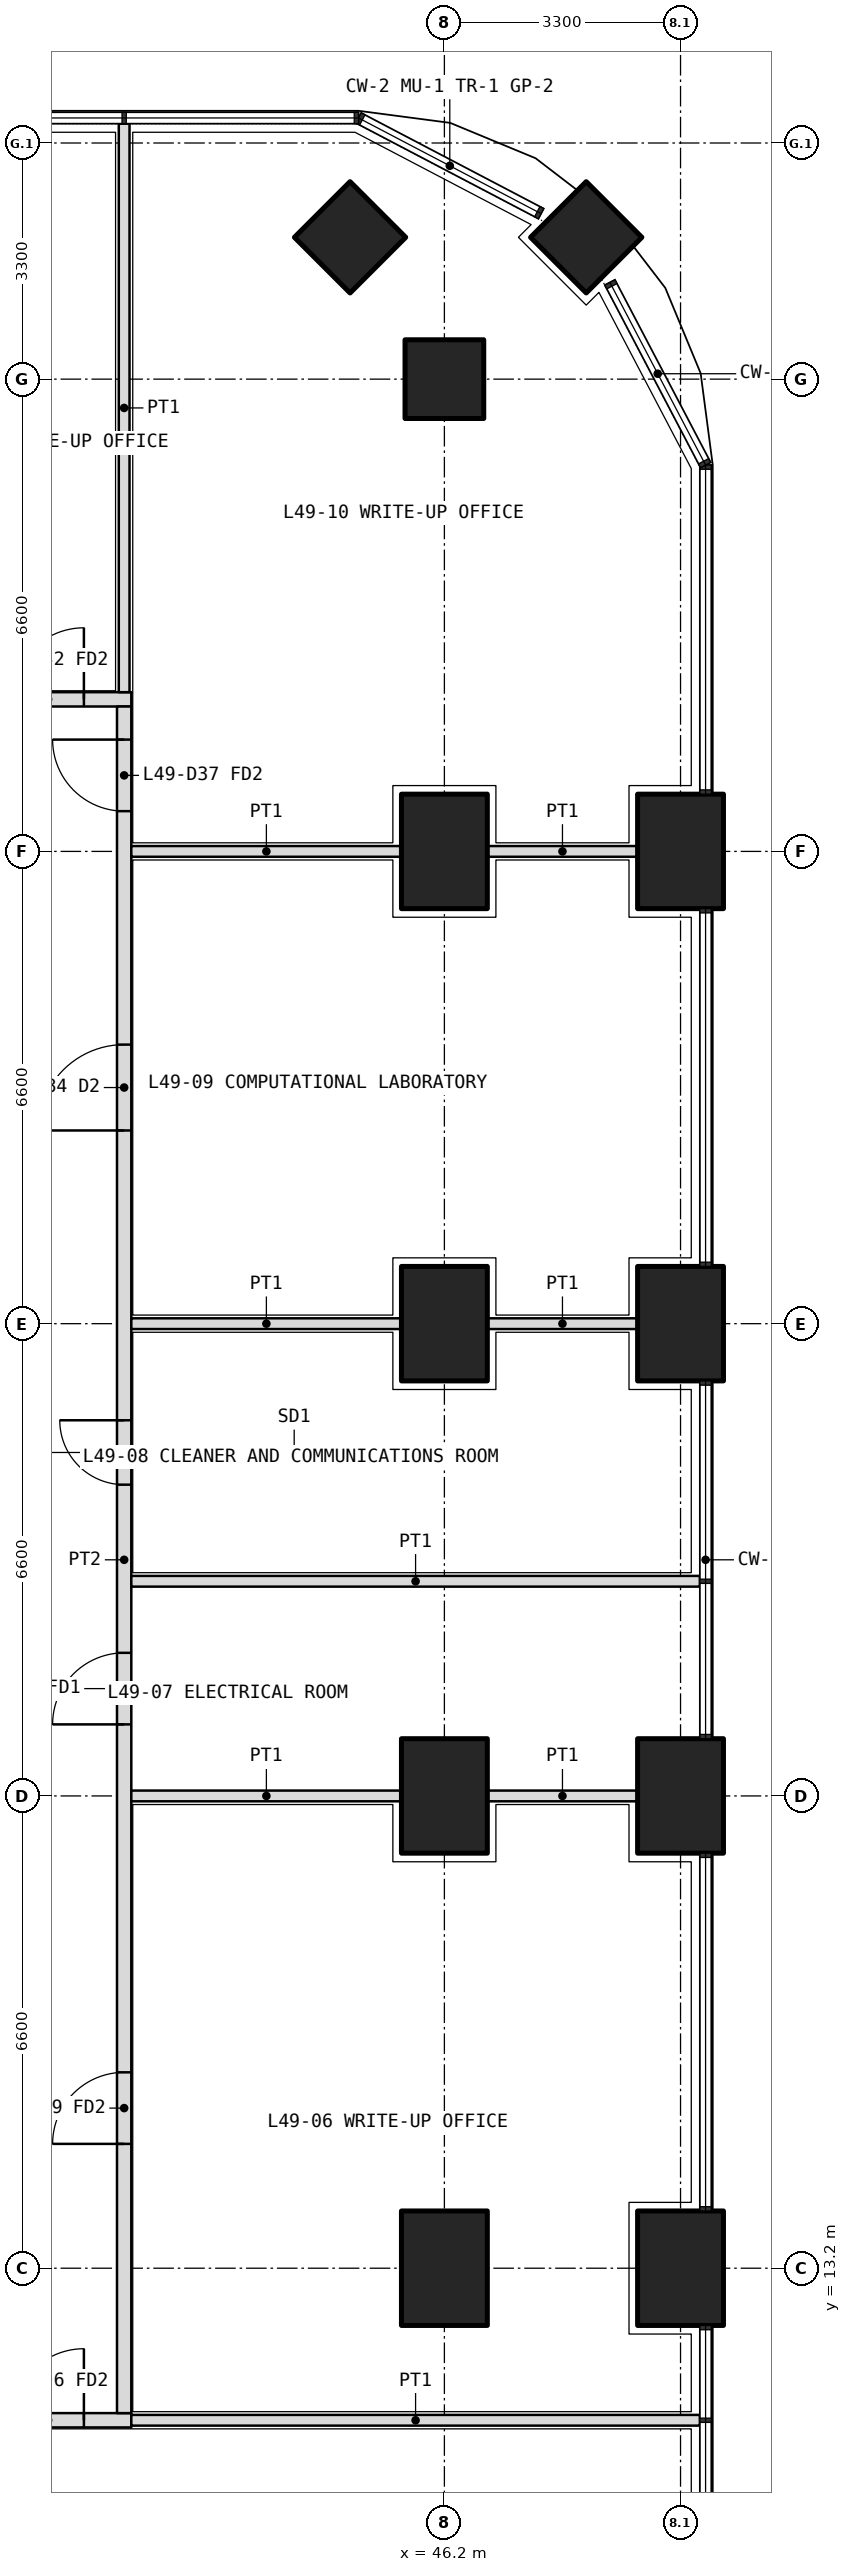
"""IFC4 building model, lengths in metres.
Left out: names, types, materials, properties, quantities, classifications, styles, units other than length and angle.
Written with IfcOpenShell. Run it as: python <this file> out.ifc"""

import sys

from ifc_helpers import new_model, si_unit, direction, frame, frame_2d, origin, origin_2d, place, context, subcontext, project, spatial, rectangle, extrude, element, fill, save


model = new_model("IFC4")
c1 = context("Model", 3, precision=1e-05, world=origin(), true_north=direction((0.0, 1.0)))
c2 = subcontext(c1, "Body", "Model", "MODEL_VIEW")
j1 = project(units=[si_unit("LENGTHUNIT", "METRE"), si_unit("PLANEANGLEUNIT", "RADIAN")], contexts=[c1])
p1 = place(None, origin())
s1 = spatial("IfcSite", under=j1, at=p1, CompositionType="ELEMENT")
p2 = place(p1, origin())
s2 = spatial("IfcBuilding", under=s1, at=p2, CompositionType="ELEMENT")
p3 = place(p2, frame((0.0, 0.0, 214.5)))
s3 = spatial("IfcBuildingStorey", under=s2, at=p3, CompositionType="ELEMENT", Elevation=214.5)
p4 = place(p3, frame((48.182, 41.582, 0.0), z_axis=(0.0, 0.0, 1.0), x_axis=(0.707106781187, 0.707106781187, 0.0)))
e1 = element("IfcColumn", 1, at=p4, inside=s3, PredefinedType="COLUMN", context=c2, shape_type="SweptSolid", body=[
    extrude(rectangle(XDim=1.1, YDim=1.1, at=origin_2d()), origin(), (0.0, 0.0, 1.0), 4.2),
])
for number, where, z_axis, x_axis in (
    (2, (49.5, 13.2, 0.0), (0.0, 0.0, 1.0), (0.0, 1.0, 0.0)),
    (3, (49.5, 19.8, 0.0), (0.0, 0.0, 1.0), (0.0, 1.0, 0.0)),
    (4, (49.5, 26.4, 0.0), (0.0, 0.0, 1.0), (0.0, 1.0, 0.0)),
    (5, (49.5, 33.0, 0.0), (0.0, 0.0, 1.0), (0.0, 1.0, 0.0)),
):
    element("IfcColumn", number, at=place(p3, frame(where, z_axis=z_axis, x_axis=x_axis)), inside=s3, PredefinedType="COLUMN", context=c2, shape_type="SweptSolid", body=[
        extrude(rectangle(XDim=1.6, YDim=1.2, at=origin_2d()), origin(), (0.0, 0.0, 1.0), 4.2),
    ])
for number, where, z_axis, x_axis in (
    (6, (46.2, 39.6, 0.0), (0.0, 0.0, 1.0), (1.0, 0.0, 0.0)),
    (7, (44.882, 41.582, 0.0), (0.0, 0.0, 1.0), (0.707, 0.707, 0.0)),
):
    element("IfcColumn", number, at=place(p3, frame(where, z_axis=z_axis, x_axis=x_axis)), inside=s3, PredefinedType="COLUMN", context=c2, shape_type="SweptSolid", body=[
        extrude(rectangle(XDim=1.1, YDim=1.1, at=origin_2d()), origin(), (0.0, 0.0, 1.0), 4.2),
    ])
for number, where, z_axis, x_axis in (
    (8, (46.2, 13.2, 0.0), (0.0, 0.0, 1.0), (0.0, 1.0, 0.0)),
    (9, (46.2, 19.8, 0.0), (0.0, 0.0, 1.0), (0.0, 1.0, 0.0)),
    (10, (46.2, 26.4, 0.0), (0.0, 0.0, 1.0), (0.0, 1.0, 0.0)),
    (11, (46.2, 33.0, 0.0), (0.0, 0.0, 1.0), (0.0, 1.0, 0.0)),
):
    element("IfcColumn", number, at=place(p3, frame(where, z_axis=z_axis, x_axis=x_axis)), inside=s3, PredefinedType="COLUMN", context=c2, shape_type="SweptSolid", body=[
        extrude(rectangle(XDim=1.6, YDim=1.2, at=origin_2d()), origin(), (0.0, 0.0, 1.0), 4.2),
    ])
p5 = place(p3, frame((10.975, 11.075, 0.0), z_axis=(0.0, 0.0, 1.0), x_axis=(1.0, 0.0, 0.0)))
e12 = element("IfcWall", 12, at=p5, inside=s3, PredefinedType="PARTITIONING", context=c2, shape_type="SweptSolid", body=[
    extrude(rectangle(XDim=30.85, YDim=0.2, at=frame_2d((15.425, 0.0))), origin(), (0.0, 0.0, 1.0), 2.85),
])
p6 = place(p5, frame((2.312, 0.0, 0.0)))
e13 = element("IfcOpeningElement", 13, at=p6, cuts=e12, PredefinedType="OPENING", context=c2, shape_type="SweptSolid", body=[
    extrude(rectangle(XDim=1.0, YDim=2.1, at=frame_2d((0.5, 1.05))), frame((0.0, 0.11, 0.0), z_axis=(0.0, -1.0, 0.0), x_axis=(1.0, 0.0, 0.0)), (0.0, 0.0, 1.0), 0.22),
])
p7 = place(p5, frame((9.975, 0.0, 0.0)))
e14 = element("IfcOpeningElement", 14, at=p7, cuts=e12, PredefinedType="OPENING", context=c2, shape_type="SweptSolid", body=[
    extrude(rectangle(XDim=1.0, YDim=2.1, at=frame_2d((0.5, 1.05))), frame((0.0, 0.11, 0.0), z_axis=(0.0, -1.0, 0.0), x_axis=(1.0, 0.0, 0.0)), (0.0, 0.0, 1.0), 0.22),
])
p8 = place(p5, frame((16.575, 0.0, 0.0)))
e15 = element("IfcOpeningElement", 15, at=p8, cuts=e12, PredefinedType="OPENING", context=c2, shape_type="SweptSolid", body=[
    extrude(rectangle(XDim=1.0, YDim=2.1, at=frame_2d((0.5, 1.05))), frame((0.0, 0.11, 0.0), z_axis=(0.0, -1.0, 0.0), x_axis=(1.0, 0.0, 0.0)), (0.0, 0.0, 1.0), 0.22),
])
p9 = place(p5, frame((23.175, 0.0, 0.0)))
e16 = element("IfcOpeningElement", 16, at=p9, cuts=e12, PredefinedType="OPENING", context=c2, shape_type="SweptSolid", body=[
    extrude(rectangle(XDim=1.0, YDim=2.1, at=frame_2d((0.5, 1.05))), frame((0.0, 0.11, 0.0), z_axis=(0.0, -1.0, 0.0), x_axis=(1.0, 0.0, 0.0)), (0.0, 0.0, 1.0), 0.22),
])
p10 = place(p5, frame((29.188, 0.0, 0.0)))
e17 = element("IfcOpeningElement", 17, at=p10, cuts=e12, PredefinedType="OPENING", context=c2, shape_type="SweptSolid", body=[
    extrude(rectangle(XDim=1.0, YDim=2.1, at=frame_2d((0.5, 1.05))), frame((0.0, 0.11, 0.0), z_axis=(0.0, -1.0, 0.0), x_axis=(1.0, 0.0, 0.0)), (0.0, 0.0, 1.0), 0.22),
])
p11 = place(p3, frame((23.1, 35.125, 0.0), z_axis=(0.0, 0.0, 1.0), x_axis=(1.0, 0.0, 0.0)))
e18 = element("IfcWall", 18, at=p11, inside=s3, PredefinedType="PARTITIONING", context=c2, shape_type="SweptSolid", body=[
    extrude(rectangle(XDim=18.725, YDim=0.2, at=frame_2d((9.362, 0.0))), origin(), (0.0, 0.0, 1.0), 2.85),
])
p12 = place(p11, frame((1.25, 0.0, 0.0)))
e19 = element("IfcOpeningElement", 19, at=p12, cuts=e18, PredefinedType="OPENING", context=c2, shape_type="SweptSolid", body=[
    extrude(rectangle(XDim=1.0, YDim=2.1, at=frame_2d((0.5, 1.05))), frame((0.0, 0.11, 0.0), z_axis=(0.0, -1.0, 0.0), x_axis=(1.0, 0.0, 0.0)), (0.0, 0.0, 1.0), 0.22),
])
p13 = place(p11, frame((4.55, 0.0, 0.0)))
e20 = element("IfcOpeningElement", 20, at=p13, cuts=e18, PredefinedType="OPENING", context=c2, shape_type="SweptSolid", body=[
    extrude(rectangle(XDim=1.0, YDim=2.1, at=frame_2d((0.5, 1.05))), frame((0.0, 0.11, 0.0), z_axis=(0.0, -1.0, 0.0), x_axis=(1.0, 0.0, 0.0)), (0.0, 0.0, 1.0), 0.22),
])
p14 = place(p11, frame((10.95, 0.0, 0.0)))
e21 = element("IfcOpeningElement", 21, at=p14, cuts=e18, PredefinedType="OPENING", context=c2, shape_type="SweptSolid", body=[
    extrude(rectangle(XDim=1.2, YDim=2.1, at=frame_2d((0.6, 1.05))), frame((0.0, 0.11, 0.0), z_axis=(0.0, -1.0, 0.0), x_axis=(1.0, 0.0, 0.0)), (0.0, 0.0, 1.0), 0.22),
])
p15 = place(p11, frame((17.062, 0.0, 0.0)))
e22 = element("IfcOpeningElement", 22, at=p15, cuts=e18, PredefinedType="OPENING", context=c2, shape_type="SweptSolid", body=[
    extrude(rectangle(XDim=1.0, YDim=2.1, at=frame_2d((0.5, 1.05))), frame((0.0, 0.11, 0.0), z_axis=(0.0, -1.0, 0.0), x_axis=(1.0, 0.0, 0.0)), (0.0, 0.0, 1.0), 0.22),
])
p16 = place(p3, frame((41.725, 11.175, 0.0), z_axis=(0.0, 0.0, 1.0), x_axis=(0.0, 1.0, 0.0)))
e23 = element("IfcWall", 23, at=p16, inside=s3, PredefinedType="PARTITIONING", context=c2, shape_type="SweptSolid", body=[
    extrude(rectangle(XDim=23.85, YDim=0.2, at=frame_2d((11.925, 0.0))), origin(), (0.0, 0.0, 1.0), 2.85),
])
p17 = place(p16, frame((3.762, 0.0, 0.0)))
e24 = element("IfcOpeningElement", 24, at=p17, cuts=e23, PredefinedType="OPENING", context=c2, shape_type="SweptSolid", body=[
    extrude(rectangle(XDim=1.0, YDim=2.1, at=frame_2d((0.5, 1.05))), frame((0.0, 0.11, 0.0), z_axis=(0.0, -1.0, 0.0), x_axis=(1.0, 0.0, 0.0)), (0.0, 0.0, 1.0), 0.22),
])
p18 = place(p16, frame((9.625, 0.0, 0.0)))
e25 = element("IfcOpeningElement", 25, at=p18, cuts=e23, PredefinedType="OPENING", context=c2, shape_type="SweptSolid", body=[
    extrude(rectangle(XDim=1.0, YDim=2.1, at=frame_2d((0.5, 1.05))), frame((0.0, 0.11, 0.0), z_axis=(0.0, -1.0, 0.0), x_axis=(1.0, 0.0, 0.0)), (0.0, 0.0, 1.0), 0.22),
])
p19 = place(p16, frame((12.975, 0.0, 0.0)))
e26 = element("IfcOpeningElement", 26, at=p19, cuts=e23, PredefinedType="OPENING", context=c2, shape_type="SweptSolid", body=[
    extrude(rectangle(XDim=0.9, YDim=2.1, at=frame_2d((0.45, 1.05))), frame((0.0, 0.11, 0.0), z_axis=(0.0, -1.0, 0.0), x_axis=(1.0, 0.0, 0.0)), (0.0, 0.0, 1.0), 0.22),
])
p20 = place(p16, frame((17.925, 0.0, 0.0)))
e27 = element("IfcOpeningElement", 27, at=p20, cuts=e23, PredefinedType="OPENING", context=c2, shape_type="SweptSolid", body=[
    extrude(rectangle(XDim=1.2, YDim=2.1, at=frame_2d((0.6, 1.05))), frame((0.0, 0.11, 0.0), z_axis=(0.0, -1.0, 0.0), x_axis=(1.0, 0.0, 0.0)), (0.0, 0.0, 1.0), 0.22),
])
p21 = place(p16, frame((22.387, 0.0, 0.0)))
e28 = element("IfcOpeningElement", 28, at=p21, cuts=e23, PredefinedType="OPENING", context=c2, shape_type="SweptSolid", body=[
    extrude(rectangle(XDim=1.0, YDim=2.1, at=frame_2d((0.5, 1.05))), frame((0.0, 0.11, 0.0), z_axis=(0.0, -1.0, 0.0), x_axis=(1.0, 0.0, 0.0)), (0.0, 0.0, 1.0), 0.22),
])
p22 = place(p3, frame((49.77, 11.075, 0.0), z_axis=(0.0, 0.0, 1.0), x_axis=(-1.0, 0.0, 0.0)))
e29 = element("IfcWall", 29, at=p22, inside=s3, PredefinedType="PARTITIONING", context=c2, shape_type="SweptSolid", body=[
    extrude(rectangle(XDim=7.945, YDim=0.15, at=frame_2d((3.973, 0.0))), origin(), (0.0, 0.0, 1.0), 2.6),
])
p23 = place(p3, frame((41.725, 43.17, 0.0), z_axis=(0.0, 0.0, 1.0), x_axis=(0.0, -1.0, 0.0)))
e30 = element("IfcWall", 30, at=p23, inside=s3, PredefinedType="PARTITIONING", context=c2, shape_type="SweptSolid", body=[
    extrude(rectangle(XDim=7.945, YDim=0.15, at=frame_2d((3.972, 0.0))), origin(), (0.0, 0.0, 1.0), 2.6),
])
p24 = place(p3, frame((49.77, 22.8, 0.0), z_axis=(0.0, 0.0, 1.0), x_axis=(-1.0, 0.0, 0.0)))
e31 = element("IfcWall", 31, at=p24, inside=s3, PredefinedType="PARTITIONING", context=c2, shape_type="SweptSolid", body=[
    extrude(rectangle(XDim=7.945, YDim=0.15, at=frame_2d((3.973, 0.0))), origin(), (0.0, 0.0, 1.0), 2.6),
])
p25 = place(p3, frame((48.9, 26.4, 0.0), z_axis=(0.0, 0.0, 1.0), x_axis=(-1.0, 0.0, 0.0)))
e32 = element("IfcWall", 32, at=p25, inside=s3, PredefinedType="PARTITIONING", context=c2, shape_type="SweptSolid", body=[
    extrude(rectangle(XDim=2.1, YDim=0.15, at=frame_2d((1.05, 0.0))), origin(), (0.0, 0.0, 1.0), 2.85),
])
p26 = place(p3, frame((45.6, 26.4, 0.0), z_axis=(0.0, 0.0, 1.0), x_axis=(-1.0, 0.0, 0.0)))
e33 = element("IfcWall", 33, at=p26, inside=s3, PredefinedType="PARTITIONING", context=c2, shape_type="SweptSolid", body=[
    extrude(rectangle(XDim=3.775, YDim=0.15, at=frame_2d((1.888, 0.0))), origin(), (0.0, 0.0, 1.0), 2.85),
])
p27 = place(p3, frame((48.9, 19.8, 0.0), z_axis=(0.0, 0.0, 1.0), x_axis=(-1.0, 0.0, 0.0)))
e34 = element("IfcWall", 34, at=p27, inside=s3, PredefinedType="PARTITIONING", context=c2, shape_type="SweptSolid", body=[
    extrude(rectangle(XDim=2.1, YDim=0.15, at=frame_2d((1.05, 0.0))), origin(), (0.0, 0.0, 1.0), 2.85),
])
p28 = place(p3, frame((45.6, 19.8, 0.0), z_axis=(0.0, 0.0, 1.0), x_axis=(-1.0, 0.0, 0.0)))
e35 = element("IfcWall", 35, at=p28, inside=s3, PredefinedType="PARTITIONING", context=c2, shape_type="SweptSolid", body=[
    extrude(rectangle(XDim=3.775, YDim=0.15, at=frame_2d((1.888, 0.0))), origin(), (0.0, 0.0, 1.0), 2.85),
])
p29 = place(p3, frame((48.9, 33.0, 0.0), z_axis=(0.0, 0.0, 1.0), x_axis=(-1.0, 0.0, 0.0)))
e36 = element("IfcWall", 36, at=p29, inside=s3, PredefinedType="PARTITIONING", context=c2, shape_type="SweptSolid", body=[
    extrude(rectangle(XDim=2.1, YDim=0.15, at=frame_2d((1.05, 0.0))), origin(), (0.0, 0.0, 1.0), 2.85),
])
p30 = place(p3, frame((45.6, 33.0, 0.0), z_axis=(0.0, 0.0, 1.0), x_axis=(-1.0, 0.0, 0.0)))
e37 = element("IfcWall", 37, at=p30, inside=s3, PredefinedType="PARTITIONING", context=c2, shape_type="SweptSolid", body=[
    extrude(rectangle(XDim=3.775, YDim=0.15, at=frame_2d((1.888, 0.0))), origin(), (0.0, 0.0, 1.0), 2.85),
])
p31 = place(p10, origin())
e38 = element("IfcDoor", 38, at=p31, inside=s3, OperationType="SINGLE_SWING_RIGHT", PredefinedType="DOOR", context=c2, shape_type="SweptSolid", body=[
    extrude(rectangle(XDim=1.0, YDim=2.1, at=frame_2d((0.5, 1.05))), frame((0.0, 0.025, 0.0), z_axis=(0.0, -1.0, 0.0), x_axis=(1.0, 0.0, 0.0)), (0.0, 0.0, 1.0), 0.05),
])
fill(e17, e38)
p32 = place(p17, origin())
e39 = element("IfcDoor", 39, at=p32, inside=s3, OperationType="SINGLE_SWING_LEFT", PredefinedType="DOOR", context=c2, shape_type="SweptSolid", body=[
    extrude(rectangle(XDim=1.0, YDim=2.1, at=frame_2d((0.5, 1.05))), frame((0.0, 0.025, 0.0), z_axis=(0.0, -1.0, 0.0), x_axis=(1.0, 0.0, 0.0)), (0.0, 0.0, 1.0), 0.05),
])
fill(e24, e39)
p33 = place(p18, origin())
e40 = element("IfcDoor", 40, at=p33, inside=s3, OperationType="SINGLE_SWING_LEFT", PredefinedType="DOOR", context=c2, shape_type="SweptSolid", body=[
    extrude(rectangle(XDim=1.0, YDim=2.1, at=frame_2d((0.5, 1.05))), frame((0.0, 0.025, 0.0), z_axis=(0.0, -1.0, 0.0), x_axis=(1.0, 0.0, 0.0)), (0.0, 0.0, 1.0), 0.05),
])
fill(e25, e40)
p34 = place(p19, origin())
e41 = element("IfcDoor", 41, at=p34, inside=s3, OperationType="SINGLE_SWING_RIGHT", PredefinedType="DOOR", context=c2, shape_type="SweptSolid", body=[
    extrude(rectangle(XDim=0.9, YDim=2.1, at=frame_2d((0.45, 1.05))), frame((0.0, 0.025, 0.0), z_axis=(0.0, -1.0, 0.0), x_axis=(1.0, 0.0, 0.0)), (0.0, 0.0, 1.0), 0.05),
])
fill(e26, e41)
p35 = place(p20, origin())
e42 = element("IfcDoor", 42, at=p35, inside=s3, OperationType="DOUBLE_DOOR_SINGLE_SWING", PredefinedType="DOOR", context=c2, shape_type="SweptSolid", body=[
    extrude(rectangle(XDim=1.2, YDim=2.1, at=frame_2d((0.6, 1.05))), frame((0.0, 0.025, 0.0), z_axis=(0.0, -1.0, 0.0), x_axis=(1.0, 0.0, 0.0)), (0.0, 0.0, 1.0), 0.05),
])
fill(e27, e42)
p36 = place(p21, origin())
e43 = element("IfcDoor", 43, at=p36, inside=s3, OperationType="SINGLE_SWING_RIGHT", PredefinedType="DOOR", context=c2, shape_type="SweptSolid", body=[
    extrude(rectangle(XDim=1.0, YDim=2.1, at=frame_2d((0.5, 1.05))), frame((0.0, 0.025, 0.0), z_axis=(0.0, -1.0, 0.0), x_axis=(1.0, 0.0, 0.0)), (0.0, 0.0, 1.0), 0.05),
])
fill(e28, e43)
p37 = place(p15, origin())
e44 = element("IfcDoor", 44, at=p37, inside=s3, OperationType="SINGLE_SWING_RIGHT", PredefinedType="DOOR", context=c2, shape_type="SweptSolid", body=[
    extrude(rectangle(XDim=1.0, YDim=2.1, at=frame_2d((0.5, 1.05))), frame((0.0, 0.025, 0.0), z_axis=(0.0, -1.0, 0.0), x_axis=(1.0, 0.0, 0.0)), (0.0, 0.0, 1.0), 0.05),
])
fill(e22, e44)
save(model, sys.argv[1])
